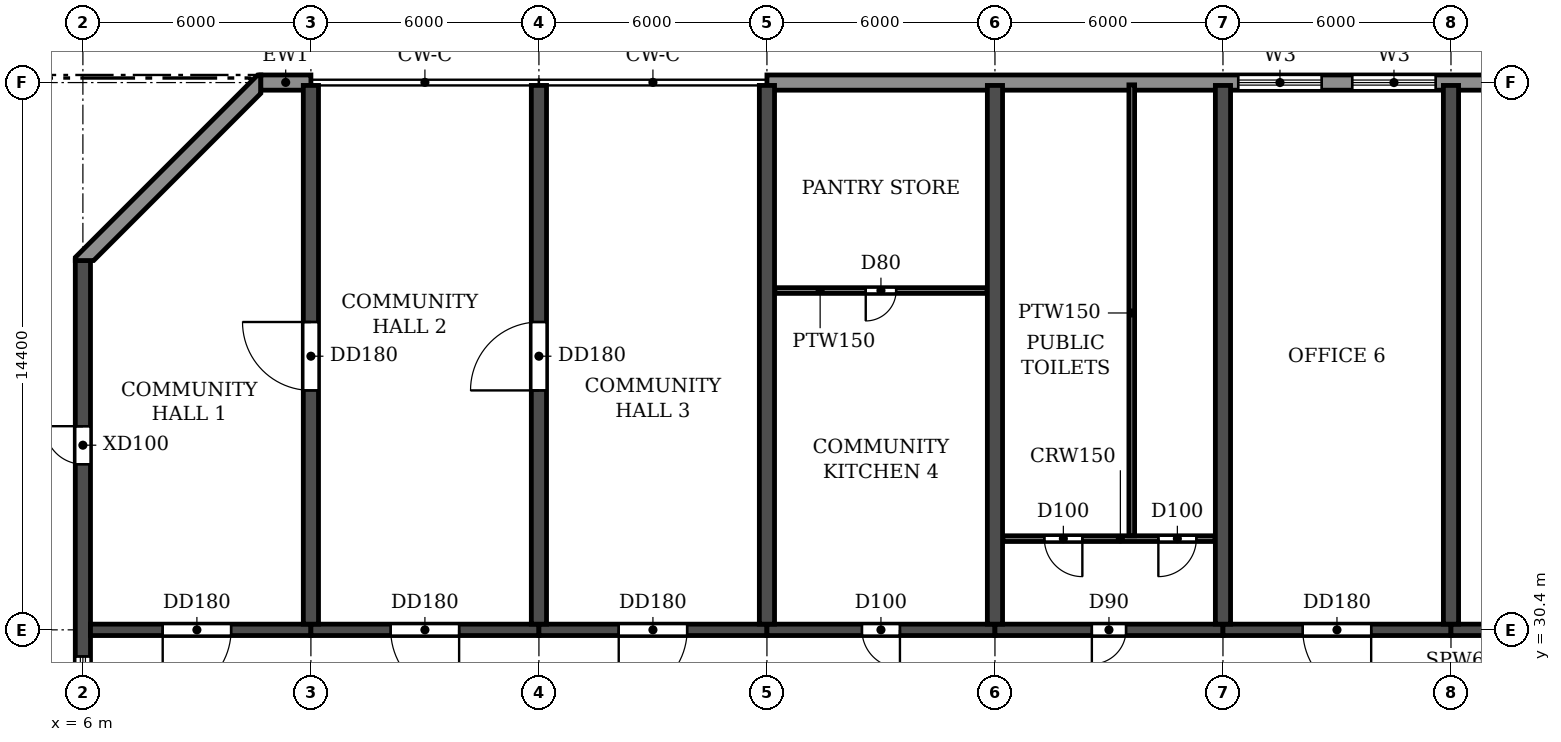
"""IFC4 building model, lengths in metres.
Left out: names, types, materials, properties, quantities, classifications, styles, units other than length and angle.
Written with IfcOpenShell. Run it as: python <this file> out.ifc"""

import sys

from ifc_helpers import new_model, si_unit, direction, frame, frame_2d, origin, place, context, subcontext, project, spatial, polyline, rectangle, outline, extrude, element, fill, save


model = new_model("IFC4")
c1 = context("Model", 3, precision=1e-05, world=origin(), true_north=direction((0.0, 1.0)))
c2 = subcontext(c1, "Body", "Model", "MODEL_VIEW")
j1 = project(units=[si_unit("LENGTHUNIT", "METRE"), si_unit("PLANEANGLEUNIT", "RADIAN")], contexts=[c1])
p1 = place(None, origin())
s1 = spatial("IfcSite", under=j1, at=p1, CompositionType="ELEMENT")
p2 = place(p1, origin())
s2 = spatial("IfcBuilding", under=s1, at=p2, CompositionType="ELEMENT")
p3 = place(p2, frame((0.0, 0.0, 53.1)))
s3 = spatial("IfcBuildingStorey", under=s2, at=p3, CompositionType="ELEMENT", Elevation=53.1)
p4 = place(p3, frame((12.0, 30.55, 0.0), z_axis=(0.0, 0.0, 1.0), x_axis=(0.0, 1.0, 0.0)))
e1 = element("IfcWall", 1, at=p4, inside=s3, PredefinedType="SHEAR", context=c2, shape_type="SweptSolid", body=[
    extrude(rectangle(XDim=14.175, YDim=0.4, at=frame_2d((7.087, 0.0))), origin(), (0.0, 0.0, 1.0), 3.05),
])
p5 = place(p4, frame((6.15, 0.0, 0.0)))
e2 = element("IfcOpeningElement", 2, at=p5, cuts=e1, PredefinedType="OPENING", context=c2, shape_type="SweptSolid", body=[
    extrude(rectangle(XDim=1.8, YDim=2.1, at=frame_2d((0.9, 1.05))), frame((0.0, 0.21, 0.0), z_axis=(0.0, -1.0, 0.0), x_axis=(1.0, 0.0, 0.0)), (0.0, 0.0, 1.0), 0.42),
])
p6 = place(p3, frame((18.0, 30.55, 0.0), z_axis=(0.0, 0.0, 1.0), x_axis=(0.0, 1.0, 0.0)))
e3 = element("IfcWall", 3, at=p6, inside=s3, PredefinedType="SHEAR", context=c2, shape_type="SweptSolid", body=[
    extrude(rectangle(XDim=14.175, YDim=0.4, at=frame_2d((7.087, 0.0))), origin(), (0.0, 0.0, 1.0), 3.05),
])
p7 = place(p6, frame((6.15, 0.0, 0.0)))
e4 = element("IfcOpeningElement", 4, at=p7, cuts=e3, PredefinedType="OPENING", context=c2, shape_type="SweptSolid", body=[
    extrude(rectangle(XDim=1.8, YDim=2.1, at=frame_2d((0.9, 1.05))), frame((0.0, 0.21, 0.0), z_axis=(0.0, -1.0, 0.0), x_axis=(1.0, 0.0, 0.0)), (0.0, 0.0, 1.0), 0.42),
])
for number, where, z_axis, x_axis in (
    (5, (24.0, 30.55, 0.0), (0.0, 0.0, 1.0), (0.0, 1.0, 0.0)),
    (6, (30.0, 30.55, 0.0), (0.0, 0.0, 1.0), (0.0, 1.0, 0.0)),
    (7, (36.0, 30.55, 0.0), (0.0, 0.0, 1.0), (0.0, 1.0, 0.0)),
    (8, (42.0, 30.55, 0.0), (0.0, 0.0, 1.0), (0.0, 1.0, 0.0)),
):
    element("IfcWall", number, at=place(p3, frame(where, z_axis=z_axis, x_axis=x_axis)), inside=s3, PredefinedType="SHEAR", context=c2, shape_type="SweptSolid", body=[
        extrude(rectangle(XDim=14.175, YDim=0.4, at=frame_2d((7.087, 0.0))), origin(), (0.0, 0.0, 1.0), 3.05),
    ])
p8 = place(p3, frame((6.0, 4.683, 0.0), z_axis=(0.0, 0.0, 1.0), x_axis=(0.0, 1.0, 0.0)))
e9 = element("IfcWall", 9, at=p8, inside=s3, PredefinedType="SHEAR", context=c2, shape_type="SweptSolid", body=[
    extrude(rectangle(XDim=35.434, YDim=0.4, at=frame_2d((17.717, 0.0))), origin(), (0.0, 0.0, 1.0), 3.05),
])
p9 = place(p8, frame((23.817, 0.0, 0.9)))
e10 = element("IfcOpeningElement", 10, at=p9, cuts=e9, PredefinedType="OPENING", context=c2, shape_type="SweptSolid", body=[
    extrude(rectangle(XDim=1.2, YDim=1.5, at=frame_2d((0.6, 0.75))), frame((0.0, 0.21, 0.0), z_axis=(0.0, -1.0, 0.0), x_axis=(1.0, 0.0, 0.0)), (0.0, 0.0, 1.0), 0.42),
])
p10 = place(p8, frame((8.017, 0.0, 0.9)))
e11 = element("IfcOpeningElement", 11, at=p10, cuts=e9, PredefinedType="OPENING", context=c2, shape_type="SweptSolid", body=[
    extrude(rectangle(XDim=1.2, YDim=1.5, at=frame_2d((0.6, 0.75))), frame((0.0, 0.21, 0.0), z_axis=(0.0, -1.0, 0.0), x_axis=(1.0, 0.0, 0.0)), (0.0, 0.0, 1.0), 0.42),
])
p11 = place(p8, frame((15.917, 0.0, 0.9)))
e12 = element("IfcOpeningElement", 12, at=p11, cuts=e9, PredefinedType="OPENING", context=c2, shape_type="SweptSolid", body=[
    extrude(rectangle(XDim=1.2, YDim=1.5, at=frame_2d((0.6, 0.75))), frame((0.0, 0.21, 0.0), z_axis=(0.0, -1.0, 0.0), x_axis=(1.0, 0.0, 0.0)), (0.0, 0.0, 1.0), 0.42),
])
p12 = place(p8, frame((30.076, 0.0, 0.0)))
e13 = element("IfcOpeningElement", 13, at=p12, cuts=e9, PredefinedType="OPENING", context=c2, shape_type="SweptSolid", body=[
    extrude(rectangle(XDim=1.0, YDim=2.1, at=frame_2d((0.5, 1.05))), frame((0.0, 0.21, 0.0), z_axis=(0.0, -1.0, 0.0), x_axis=(1.0, 0.0, 0.0)), (0.0, 0.0, 1.0), 0.42),
])
p13 = place(p8, frame((3.159, 0.0, 0.0)))
e14 = element("IfcOpeningElement", 14, at=p13, cuts=e9, PredefinedType="OPENING", context=c2, shape_type="SweptSolid", body=[
    extrude(rectangle(XDim=1.0, YDim=2.1, at=frame_2d((0.5, 1.05))), frame((0.0, 0.21, 0.0), z_axis=(0.0, -1.0, 0.0), x_axis=(1.0, 0.0, 0.0)), (0.0, 0.0, 1.0), 0.42),
])
p14 = place(p3, frame((6.2, 30.4, 0.0), z_axis=(0.0, 0.0, 1.0), x_axis=(1.0, 0.0, 0.0)))
e15 = element("IfcWall", 15, at=p14, inside=s3, PredefinedType="SHEAR", context=c2, shape_type="SweptSolid", body=[
    extrude(rectangle(XDim=5.8, YDim=0.3, at=frame_2d((2.9, 0.0))), origin(), (0.0, 0.0, 1.0), 2.45),
])
p15 = place(p14, frame((1.9, 0.0, 0.0)))
e16 = element("IfcOpeningElement", 16, at=p15, cuts=e15, PredefinedType="OPENING", context=c2, shape_type="SweptSolid", body=[
    extrude(rectangle(XDim=1.8, YDim=2.1, at=frame_2d((0.9, 1.05))), frame((0.0, 0.16, 0.0), z_axis=(0.0, -1.0, 0.0), x_axis=(1.0, 0.0, 0.0)), (0.0, 0.0, 1.0), 0.32),
])
p16 = place(p3, frame((12.0, 30.4, 0.0), z_axis=(0.0, 0.0, 1.0), x_axis=(1.0, 0.0, 0.0)))
e17 = element("IfcWall", 17, at=p16, inside=s3, PredefinedType="SHEAR", context=c2, shape_type="SweptSolid", body=[
    extrude(rectangle(XDim=6.0, YDim=0.3, at=frame_2d((3.0, 0.0))), origin(), (0.0, 0.0, 1.0), 2.45),
])
p17 = place(p16, frame((2.1, 0.0, 0.0)))
e18 = element("IfcOpeningElement", 18, at=p17, cuts=e17, PredefinedType="OPENING", context=c2, shape_type="SweptSolid", body=[
    extrude(rectangle(XDim=1.8, YDim=2.1, at=frame_2d((0.9, 1.05))), frame((0.0, 0.16, 0.0), z_axis=(0.0, -1.0, 0.0), x_axis=(1.0, 0.0, 0.0)), (0.0, 0.0, 1.0), 0.32),
])
p18 = place(p3, frame((18.0, 30.4, 0.0), z_axis=(0.0, 0.0, 1.0), x_axis=(1.0, 0.0, 0.0)))
e19 = element("IfcWall", 19, at=p18, inside=s3, PredefinedType="SHEAR", context=c2, shape_type="SweptSolid", body=[
    extrude(rectangle(XDim=6.0, YDim=0.3, at=frame_2d((3.0, 0.0))), origin(), (0.0, 0.0, 1.0), 2.45),
])
p19 = place(p18, frame((2.1, 0.0, 0.0)))
e20 = element("IfcOpeningElement", 20, at=p19, cuts=e19, PredefinedType="OPENING", context=c2, shape_type="SweptSolid", body=[
    extrude(rectangle(XDim=1.8, YDim=2.1, at=frame_2d((0.9, 1.05))), frame((0.0, 0.16, 0.0), z_axis=(0.0, -1.0, 0.0), x_axis=(1.0, 0.0, 0.0)), (0.0, 0.0, 1.0), 0.32),
])
p20 = place(p3, frame((24.0, 30.4, 0.0), z_axis=(0.0, 0.0, 1.0), x_axis=(1.0, 0.0, 0.0)))
e21 = element("IfcWall", 21, at=p20, inside=s3, PredefinedType="SHEAR", context=c2, shape_type="SweptSolid", body=[
    extrude(rectangle(XDim=6.0, YDim=0.3, at=frame_2d((3.0, 0.0))), origin(), (0.0, 0.0, 1.0), 2.45),
])
p21 = place(p20, frame((2.5, 0.0, 0.0)))
e22 = element("IfcOpeningElement", 22, at=p21, cuts=e21, PredefinedType="OPENING", context=c2, shape_type="SweptSolid", body=[
    extrude(rectangle(XDim=1.0, YDim=2.1, at=frame_2d((0.5, 1.05))), frame((0.0, 0.16, 0.0), z_axis=(0.0, -1.0, 0.0), x_axis=(1.0, 0.0, 0.0)), (0.0, 0.0, 1.0), 0.32),
])
p22 = place(p3, frame((30.0, 30.4, 0.0), z_axis=(0.0, 0.0, 1.0), x_axis=(1.0, 0.0, 0.0)))
e23 = element("IfcWall", 23, at=p22, inside=s3, PredefinedType="SHEAR", context=c2, shape_type="SweptSolid", body=[
    extrude(rectangle(XDim=6.0, YDim=0.3, at=frame_2d((3.0, 0.0))), origin(), (0.0, 0.0, 1.0), 2.45),
])
p23 = place(p22, frame((2.55, 0.0, 0.0)))
e24 = element("IfcOpeningElement", 24, at=p23, cuts=e23, PredefinedType="OPENING", context=c2, shape_type="SweptSolid", body=[
    extrude(rectangle(XDim=0.9, YDim=2.1, at=frame_2d((0.45, 1.05))), frame((0.0, 0.16, 0.0), z_axis=(0.0, -1.0, 0.0), x_axis=(1.0, 0.0, 0.0)), (0.0, 0.0, 1.0), 0.32),
])
p24 = place(p3, frame((36.0, 30.4, 0.0), z_axis=(0.0, 0.0, 1.0), x_axis=(1.0, 0.0, 0.0)))
e25 = element("IfcWall", 25, at=p24, inside=s3, PredefinedType="SHEAR", context=c2, shape_type="SweptSolid", body=[
    extrude(rectangle(XDim=6.0, YDim=0.3, at=frame_2d((3.0, 0.0))), origin(), (0.0, 0.0, 1.0), 2.45),
])
p25 = place(p24, frame((2.1, 0.0, 0.0)))
e26 = element("IfcOpeningElement", 26, at=p25, cuts=e25, PredefinedType="OPENING", context=c2, shape_type="SweptSolid", body=[
    extrude(rectangle(XDim=1.8, YDim=2.1, at=frame_2d((0.9, 1.05))), frame((0.0, 0.16, 0.0), z_axis=(0.0, -1.0, 0.0), x_axis=(1.0, 0.0, 0.0)), (0.0, 0.0, 1.0), 0.32),
])
p26 = place(p3, frame((42.0, 30.4, 0.0), z_axis=(0.0, 0.0, 1.0), x_axis=(1.0, 0.0, 0.0)))
e27 = element("IfcWall", 27, at=p26, inside=s3, PredefinedType="SHEAR", context=c2, shape_type="SweptSolid", body=[
    extrude(rectangle(XDim=6.0, YDim=0.3, at=frame_2d((3.0, 0.0))), origin(), (0.0, 0.0, 1.0), 2.45),
])
p27 = place(p26, frame((2.1, 0.0, 0.0)))
e28 = element("IfcOpeningElement", 28, at=p27, cuts=e27, PredefinedType="OPENING", context=c2, shape_type="SweptSolid", body=[
    extrude(rectangle(XDim=1.8, YDim=2.1, at=frame_2d((0.9, 1.05))), frame((0.0, 0.16, 0.0), z_axis=(0.0, -1.0, 0.0), x_axis=(1.0, 0.0, 0.0)), (0.0, 0.0, 1.0), 0.32),
])
p28 = place(p3, frame((54.0, 44.8, 0.0), z_axis=(0.0, 0.0, 1.0), x_axis=(-1.0, 0.0, 0.0)))
e29 = element("IfcWall", 29, at=p28, inside=s3, PredefinedType="STANDARD", context=c2, shape_type="SweptSolid", body=[
    extrude(rectangle(XDim=30.0, YDim=0.4, at=frame_2d((15.0, 0.0))), origin(), (0.0, 0.0, 1.0), 3.05),
])
p29 = place(p28, frame((15.4, 0.0, 0.6)))
e30 = element("IfcOpeningElement", 30, at=p29, cuts=e29, PredefinedType="OPENING", context=c2, shape_type="SweptSolid", body=[
    extrude(rectangle(XDim=2.2, YDim=1.8, at=frame_2d((1.1, 0.9))), frame((0.0, 0.21, 0.0), z_axis=(0.0, -1.0, 0.0), x_axis=(1.0, 0.0, 0.0)), (0.0, 0.0, 1.0), 0.42),
])
p30 = place(p28, frame((12.4, 0.0, 0.6)))
e31 = element("IfcOpeningElement", 31, at=p30, cuts=e29, PredefinedType="OPENING", context=c2, shape_type="SweptSolid", body=[
    extrude(rectangle(XDim=2.2, YDim=1.8, at=frame_2d((1.1, 0.9))), frame((0.0, 0.21, 0.0), z_axis=(0.0, -1.0, 0.0), x_axis=(1.0, 0.0, 0.0)), (0.0, 0.0, 1.0), 0.42),
])
p31 = place(p3, frame((12.0, 44.8, 0.0), z_axis=(0.0, 0.0, 1.0), x_axis=(-1.0, 0.0, 0.0)))
e32 = element("IfcWall", 32, at=p31, inside=s3, PredefinedType="STANDARD", context=c2, shape_type="SweptSolid", body=[
    extrude(rectangle(XDim=1.317, YDim=0.4, at=frame_2d((0.659, 0.0))), origin(), (0.0, 0.0, 1.0), 3.05),
])
p32 = place(p3, origin())
e33 = element("IfcWall", 33, at=p32, inside=s3, PredefinedType="STANDARD", context=c2, shape_type="SweptSolid", body=[
    extrude(outline(polyline([(10.683, 45.0), (10.6, 45.0), (5.8, 40.2), (5.8, 40.117), (6.283, 40.117), (10.683, 44.517), (10.683, 45.0)])), origin(), (0.0, 0.0, 1.0), 3.05),
])
p33 = place(p3, frame((30.21, 32.8, 0.0), z_axis=(0.0, 0.0, 1.0), x_axis=(1.0, 0.0, 0.0)))
e34 = element("IfcWall", 34, at=p33, inside=s3, PredefinedType="PARTITIONING", context=c2, shape_type="SweptSolid", body=[
    extrude(rectangle(XDim=5.58, YDim=0.15, at=frame_2d((2.79, 0.0))), origin(), (0.0, 0.0, 1.0), 3.05),
])
p34 = place(p33, frame((1.09, 0.0, 0.0)))
e35 = element("IfcOpeningElement", 35, at=p34, cuts=e34, PredefinedType="OPENING", context=c2, shape_type="SweptSolid", body=[
    extrude(rectangle(XDim=1.0, YDim=2.1, at=frame_2d((0.5, 1.05))), frame((0.0, 0.085, 0.0), z_axis=(0.0, -1.0, 0.0), x_axis=(1.0, 0.0, 0.0)), (0.0, 0.0, 1.0), 0.17),
])
p35 = place(p33, frame((4.09, 0.0, 0.0)))
e36 = element("IfcOpeningElement", 36, at=p35, cuts=e34, PredefinedType="OPENING", context=c2, shape_type="SweptSolid", body=[
    extrude(rectangle(XDim=1.0, YDim=2.1, at=frame_2d((0.5, 1.05))), frame((0.0, 0.085, 0.0), z_axis=(0.0, -1.0, 0.0), x_axis=(1.0, 0.0, 0.0)), (0.0, 0.0, 1.0), 0.17),
])
p36 = place(p3, frame((24.21, 39.328, 0.0), z_axis=(0.0, 0.0, 1.0), x_axis=(1.0, 0.0, 0.0)))
e37 = element("IfcWall", 37, at=p36, inside=s3, PredefinedType="PARTITIONING", context=c2, shape_type="SweptSolid", body=[
    extrude(rectangle(XDim=5.58, YDim=0.15, at=frame_2d((2.79, 0.0))), origin(), (0.0, 0.0, 1.0), 3.05),
])
p37 = place(p36, frame((2.39, 0.0, 0.0)))
e38 = element("IfcOpeningElement", 38, at=p37, cuts=e37, PredefinedType="OPENING", context=c2, shape_type="SweptSolid", body=[
    extrude(rectangle(XDim=0.8, YDim=2.1, at=frame_2d((0.4, 1.05))), frame((0.0, 0.085, 0.0), z_axis=(0.0, -1.0, 0.0), x_axis=(1.0, 0.0, 0.0)), (0.0, 0.0, 1.0), 0.17),
])
p38 = place(p3, frame((33.6, 32.875, 0.0), z_axis=(0.0, 0.0, 1.0), x_axis=(0.0, 1.0, 0.0)))
e39 = element("IfcWall", 39, at=p38, inside=s3, PredefinedType="PARTITIONING", context=c2, shape_type="SweptSolid", body=[
    extrude(rectangle(XDim=11.865, YDim=0.15, at=frame_2d((5.933, 0.0))), origin(), (0.0, 0.0, 1.0), 3.05),
])
p39 = place(p29, origin())
e40 = element("IfcWindow", 40, at=p39, inside=s3, PartitioningType="DOUBLE_PANEL_HORIZONTAL", PredefinedType="WINDOW", context=c2, shape_type="SweptSolid", body=[
    extrude(rectangle(XDim=2.2, YDim=1.8, at=frame_2d((1.1, 0.9))), frame((0.0, 0.03, 0.0), z_axis=(0.0, -1.0, 0.0), x_axis=(1.0, 0.0, 0.0)), (0.0, 0.0, 1.0), 0.06),
])
fill(e30, e40)
p40 = place(p30, origin())
e41 = element("IfcWindow", 41, at=p40, inside=s3, PartitioningType="DOUBLE_PANEL_HORIZONTAL", PredefinedType="WINDOW", context=c2, shape_type="SweptSolid", body=[
    extrude(rectangle(XDim=2.2, YDim=1.8, at=frame_2d((1.1, 0.9))), frame((0.0, 0.03, 0.0), z_axis=(0.0, -1.0, 0.0), x_axis=(1.0, 0.0, 0.0)), (0.0, 0.0, 1.0), 0.06),
])
fill(e31, e41)
p41 = place(p9, origin())
e42 = element("IfcWindow", 42, at=p41, inside=s3, PartitioningType="SINGLE_PANEL", PredefinedType="WINDOW", context=c2, shape_type="SweptSolid", body=[
    extrude(rectangle(XDim=1.2, YDim=1.5, at=frame_2d((0.6, 0.75))), frame((0.0, 0.03, 0.0), z_axis=(0.0, -1.0, 0.0), x_axis=(1.0, 0.0, 0.0)), (0.0, 0.0, 1.0), 0.06),
])
fill(e10, e42)
p42 = place(p15, frame((1.8, 0.0, 0.0), z_axis=(0.0, 0.0, 1.0), x_axis=(-1.0, 0.0, 0.0)))
e43 = element("IfcDoor", 43, at=p42, inside=s3, OperationType="DOUBLE_DOOR_SINGLE_SWING", PredefinedType="DOOR", context=c2, shape_type="SweptSolid", body=[
    extrude(rectangle(XDim=1.8, YDim=2.1, at=frame_2d((0.9, 1.05))), frame((0.0, 0.025, 0.0), z_axis=(0.0, -1.0, 0.0), x_axis=(1.0, 0.0, 0.0)), (0.0, 0.0, 1.0), 0.05),
])
fill(e16, e43)
p43 = place(p17, frame((1.8, 0.0, 0.0), z_axis=(0.0, 0.0, 1.0), x_axis=(-1.0, 0.0, 0.0)))
e44 = element("IfcDoor", 44, at=p43, inside=s3, OperationType="DOUBLE_DOOR_SINGLE_SWING", PredefinedType="DOOR", context=c2, shape_type="SweptSolid", body=[
    extrude(rectangle(XDim=1.8, YDim=2.1, at=frame_2d((0.9, 1.05))), frame((0.0, 0.025, 0.0), z_axis=(0.0, -1.0, 0.0), x_axis=(1.0, 0.0, 0.0)), (0.0, 0.0, 1.0), 0.05),
])
fill(e18, e44)
p44 = place(p19, frame((1.8, 0.0, 0.0), z_axis=(0.0, 0.0, 1.0), x_axis=(-1.0, 0.0, 0.0)))
e45 = element("IfcDoor", 45, at=p44, inside=s3, OperationType="DOUBLE_DOOR_SINGLE_SWING", PredefinedType="DOOR", context=c2, shape_type="SweptSolid", body=[
    extrude(rectangle(XDim=1.8, YDim=2.1, at=frame_2d((0.9, 1.05))), frame((0.0, 0.025, 0.0), z_axis=(0.0, -1.0, 0.0), x_axis=(1.0, 0.0, 0.0)), (0.0, 0.0, 1.0), 0.05),
])
fill(e20, e45)
p45 = place(p21, frame((1.0, 0.0, 0.0), z_axis=(0.0, 0.0, 1.0), x_axis=(-1.0, 0.0, 0.0)))
e46 = element("IfcDoor", 46, at=p45, inside=s3, OperationType="SINGLE_SWING_LEFT", PredefinedType="DOOR", context=c2, shape_type="SweptSolid", body=[
    extrude(rectangle(XDim=1.0, YDim=2.1, at=frame_2d((0.5, 1.05))), frame((0.0, 0.025, 0.0), z_axis=(0.0, -1.0, 0.0), x_axis=(1.0, 0.0, 0.0)), (0.0, 0.0, 1.0), 0.05),
])
fill(e22, e46)
p46 = place(p23, frame((0.9, 0.0, 0.0), z_axis=(0.0, 0.0, 1.0), x_axis=(-1.0, 0.0, 0.0)))
e47 = element("IfcDoor", 47, at=p46, inside=s3, OperationType="SINGLE_SWING_RIGHT", PredefinedType="DOOR", context=c2, shape_type="SweptSolid", body=[
    extrude(rectangle(XDim=0.9, YDim=2.1, at=frame_2d((0.45, 1.05))), frame((0.0, 0.025, 0.0), z_axis=(0.0, -1.0, 0.0), x_axis=(1.0, 0.0, 0.0)), (0.0, 0.0, 1.0), 0.05),
])
fill(e24, e47)
p47 = place(p25, frame((1.8, 0.0, 0.0), z_axis=(0.0, 0.0, 1.0), x_axis=(-1.0, 0.0, 0.0)))
e48 = element("IfcDoor", 48, at=p47, inside=s3, OperationType="DOUBLE_DOOR_SINGLE_SWING", PredefinedType="DOOR", context=c2, shape_type="SweptSolid", body=[
    extrude(rectangle(XDim=1.8, YDim=2.1, at=frame_2d((0.9, 1.05))), frame((0.0, 0.025, 0.0), z_axis=(0.0, -1.0, 0.0), x_axis=(1.0, 0.0, 0.0)), (0.0, 0.0, 1.0), 0.05),
])
fill(e26, e48)
p48 = place(p12, origin())
e49 = element("IfcDoor", 49, at=p48, inside=s3, OperationType="SINGLE_SWING_RIGHT", PredefinedType="DOOR", context=c2, shape_type="SweptSolid", body=[
    extrude(rectangle(XDim=1.0, YDim=2.1, at=frame_2d((0.5, 1.05))), frame((0.0, 0.025, 0.0), z_axis=(0.0, -1.0, 0.0), x_axis=(1.0, 0.0, 0.0)), (0.0, 0.0, 1.0), 0.05),
])
fill(e13, e49)
p49 = place(p5, origin())
e50 = element("IfcDoor", 50, at=p49, inside=s3, OperationType="DOUBLE_DOOR_SINGLE_SWING", PredefinedType="DOOR", context=c2, shape_type="SweptSolid", body=[
    extrude(rectangle(XDim=1.8, YDim=2.1, at=frame_2d((0.9, 1.05))), frame((0.0, 0.025, 0.0), z_axis=(0.0, -1.0, 0.0), x_axis=(1.0, 0.0, 0.0)), (0.0, 0.0, 1.0), 0.05),
])
fill(e2, e50)
p50 = place(p7, origin())
e51 = element("IfcDoor", 51, at=p50, inside=s3, OperationType="DOUBLE_DOOR_SINGLE_SWING", PredefinedType="DOOR", context=c2, shape_type="SweptSolid", body=[
    extrude(rectangle(XDim=1.8, YDim=2.1, at=frame_2d((0.9, 1.05))), frame((0.0, 0.025, 0.0), z_axis=(0.0, -1.0, 0.0), x_axis=(1.0, 0.0, 0.0)), (0.0, 0.0, 1.0), 0.05),
])
fill(e4, e51)
p51 = place(p37, frame((0.8, 0.0, 0.0), z_axis=(0.0, 0.0, 1.0), x_axis=(-1.0, 0.0, 0.0)))
e52 = element("IfcDoor", 52, at=p51, inside=s3, OperationType="SINGLE_SWING_RIGHT", PredefinedType="DOOR", context=c2, shape_type="SweptSolid", body=[
    extrude(rectangle(XDim=0.8, YDim=2.1, at=frame_2d((0.4, 1.05))), frame((0.0, 0.025, 0.0), z_axis=(0.0, -1.0, 0.0), x_axis=(1.0, 0.0, 0.0)), (0.0, 0.0, 1.0), 0.05),
])
fill(e38, e52)
p52 = place(p34, frame((1.0, 0.0, 0.0), z_axis=(0.0, 0.0, 1.0), x_axis=(-1.0, 0.0, 0.0)))
e53 = element("IfcDoor", 53, at=p52, inside=s3, OperationType="SINGLE_SWING_LEFT", PredefinedType="DOOR", context=c2, shape_type="SweptSolid", body=[
    extrude(rectangle(XDim=1.0, YDim=2.1, at=frame_2d((0.5, 1.05))), frame((0.0, 0.025, 0.0), z_axis=(0.0, -1.0, 0.0), x_axis=(1.0, 0.0, 0.0)), (0.0, 0.0, 1.0), 0.05),
])
fill(e35, e53)
p53 = place(p35, frame((1.0, 0.0, 0.0), z_axis=(0.0, 0.0, 1.0), x_axis=(-1.0, 0.0, 0.0)))
e54 = element("IfcDoor", 54, at=p53, inside=s3, OperationType="SINGLE_SWING_RIGHT", PredefinedType="DOOR", context=c2, shape_type="SweptSolid", body=[
    extrude(rectangle(XDim=1.0, YDim=2.1, at=frame_2d((0.5, 1.05))), frame((0.0, 0.025, 0.0), z_axis=(0.0, -1.0, 0.0), x_axis=(1.0, 0.0, 0.0)), (0.0, 0.0, 1.0), 0.05),
])
fill(e36, e54)
save(model, sys.argv[1])
